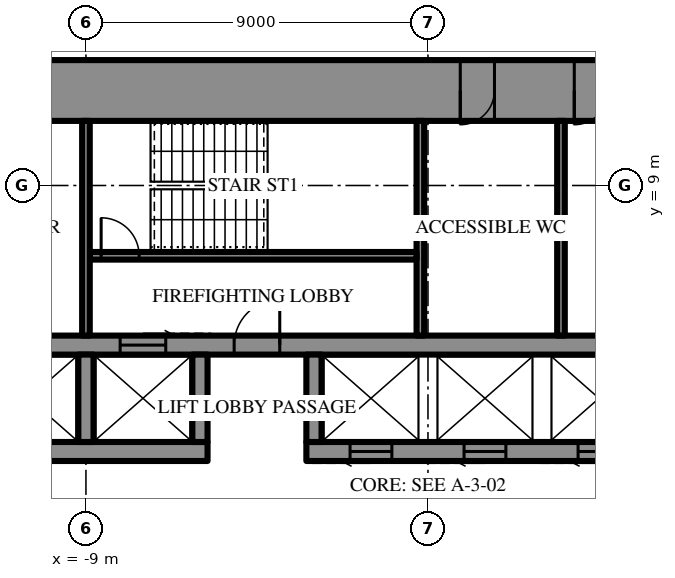
"""IFC4 building model, lengths in metres.
Left out: names, types, materials, properties, quantities, classifications, styles, units other than length and angle.
Written with IfcOpenShell. Run it as: python <this file> out.ifc"""

import sys

from ifc_helpers import new_model, si_unit, direction, frame, frame_2d, origin, place, context, subcontext, project, spatial, rectangle, extrude, element, fill, save


model = new_model("IFC4")
c1 = context("Model", 3, precision=1e-05, world=origin(), true_north=direction((0.0, 1.0)))
c2 = subcontext(c1, "Body", "Model", "MODEL_VIEW")
j1 = project(units=[si_unit("LENGTHUNIT", "METRE"), si_unit("PLANEANGLEUNIT", "RADIAN")], contexts=[c1])
p1 = place(None, origin())
s1 = spatial("IfcSite", under=j1, at=p1, CompositionType="ELEMENT")
p2 = place(p1, origin())
s2 = spatial("IfcBuilding", under=s1, at=p2, CompositionType="ELEMENT")
p3 = place(p2, frame((0.0, 0.0, 195.1)))
s3 = spatial("IfcBuildingStorey", under=s2, at=p3, CompositionType="ELEMENT", Elevation=195.1)
p4 = place(p3, frame((-18.6, 11.5, 0.0), z_axis=(0.0, 0.0, 1.0), x_axis=(1.0, 0.0, 0.0)))
e1 = element("IfcWall", 1, at=p4, inside=s3, PredefinedType="SHEAR", context=c2, shape_type="SweptSolid", body=[
    extrude(rectangle(XDim=37.2, YDim=1.6, at=frame_2d((18.6, 0.0))), origin(), (0.0, 0.0, 1.0), 4.2),
])
p5 = place(p4, frame((19.45, 0.0, 0.0)))
e2 = element("IfcOpeningElement", 2, at=p5, cuts=e1, PredefinedType="OPENING", context=c2, shape_type="SweptSolid", body=[
    extrude(rectangle(XDim=0.9, YDim=2.2, at=frame_2d((0.45, 1.1))), frame((0.0, 0.81, 0.0), z_axis=(0.0, -1.0, 0.0), x_axis=(1.0, 0.0, 0.0)), (0.0, 0.0, 1.0), 1.62),
])
p6 = place(p4, frame((22.45, 0.0, 0.0)))
e3 = element("IfcOpeningElement", 3, at=p6, cuts=e1, PredefinedType="OPENING", context=c2, shape_type="SweptSolid", body=[
    extrude(rectangle(XDim=0.9, YDim=2.2, at=frame_2d((0.45, 1.1))), frame((0.0, 0.81, 0.0), z_axis=(0.0, -1.0, 0.0), x_axis=(1.0, 0.0, 0.0)), (0.0, 0.0, 1.0), 1.62),
])
p7 = place(p4, frame((25.5, 0.0, 0.0)))
e4 = element("IfcOpeningElement", 4, at=p7, cuts=e1, PredefinedType="OPENING", context=c2, shape_type="SweptSolid", body=[
    extrude(rectangle(XDim=1.0, YDim=2.2, at=frame_2d((0.5, 1.1))), frame((0.0, 0.81, 0.0), z_axis=(0.0, -1.0, 0.0), x_axis=(1.0, 0.0, 0.0)), (0.0, 0.0, 1.0), 1.62),
])
p8 = place(p4, frame((1.8, 0.0, 0.0)))
e5 = element("IfcOpeningElement", 5, at=p8, cuts=e1, PredefinedType="OPENING", context=c2, shape_type="SweptSolid", body=[
    extrude(rectangle(XDim=0.9, YDim=2.2, at=frame_2d((0.45, 1.1))), frame((0.0, 0.81, 0.0), z_axis=(0.0, -1.0, 0.0), x_axis=(1.0, 0.0, 0.0)), (0.0, 0.0, 1.0), 1.62),
])
p9 = place(p4, frame((4.65, 0.0, 0.0)))
e6 = element("IfcOpeningElement", 6, at=p9, cuts=e1, PredefinedType="OPENING", context=c2, shape_type="SweptSolid", body=[
    extrude(rectangle(XDim=0.9, YDim=2.2, at=frame_2d((0.45, 1.1))), frame((0.0, 0.81, 0.0), z_axis=(0.0, -1.0, 0.0), x_axis=(1.0, 0.0, 0.0)), (0.0, 0.0, 1.0), 1.62),
])
p10 = place(p4, frame((7.75, 0.0, 0.0)))
e7 = element("IfcOpeningElement", 7, at=p10, cuts=e1, PredefinedType="OPENING", context=c2, shape_type="SweptSolid", body=[
    extrude(rectangle(XDim=0.9, YDim=2.2, at=frame_2d((0.45, 1.1))), frame((0.0, 0.81, 0.0), z_axis=(0.0, -1.0, 0.0), x_axis=(1.0, 0.0, 0.0)), (0.0, 0.0, 1.0), 1.62),
])
p11 = place(p4, frame((28.55, 0.0, 0.0)))
e8 = element("IfcOpeningElement", 8, at=p11, cuts=e1, PredefinedType="OPENING", context=c2, shape_type="SweptSolid", body=[
    extrude(rectangle(XDim=0.9, YDim=2.2, at=frame_2d((0.45, 1.1))), frame((0.0, 0.81, 0.0), z_axis=(0.0, -1.0, 0.0), x_axis=(1.0, 0.0, 0.0)), (0.0, 0.0, 1.0), 1.62),
])
p12 = place(p4, frame((31.65, 0.0, 0.0)))
e9 = element("IfcOpeningElement", 9, at=p12, cuts=e1, PredefinedType="OPENING", context=c2, shape_type="SweptSolid", body=[
    extrude(rectangle(XDim=0.9, YDim=2.2, at=frame_2d((0.45, 1.1))), frame((0.0, 0.81, 0.0), z_axis=(0.0, -1.0, 0.0), x_axis=(1.0, 0.0, 0.0)), (0.0, 0.0, 1.0), 1.62),
])
p13 = place(p4, frame((34.5, 0.0, 0.0)))
e10 = element("IfcOpeningElement", 10, at=p13, cuts=e1, PredefinedType="OPENING", context=c2, shape_type="SweptSolid", body=[
    extrude(rectangle(XDim=0.9, YDim=2.2, at=frame_2d((0.45, 1.1))), frame((0.0, 0.81, 0.0), z_axis=(0.0, -1.0, 0.0), x_axis=(1.0, 0.0, 0.0)), (0.0, 0.0, 1.0), 1.62),
])
p14 = place(p3, frame((-11.7, 2.0, 0.0), z_axis=(0.0, 0.0, 1.0), x_axis=(1.0, 0.0, 0.0)))
e11 = element("IfcWall", 11, at=p14, inside=s3, PredefinedType="SHEAR", context=c2, shape_type="SweptSolid", body=[
    extrude(rectangle(XDim=5.9, YDim=0.5, at=frame_2d((2.95, 0.0))), origin(), (0.0, 0.0, 1.0), 4.2),
])
p15 = place(p3, frame((-3.2, 2.0, 0.0), z_axis=(0.0, 0.0, 1.0), x_axis=(1.0, 0.0, 0.0)))
e12 = element("IfcWall", 12, at=p15, inside=s3, PredefinedType="SHEAR", context=c2, shape_type="SweptSolid", body=[
    extrude(rectangle(XDim=14.9, YDim=0.5, at=frame_2d((7.45, 0.0))), origin(), (0.0, 0.0, 1.0), 4.2),
])
p16 = place(p15, frame((1.15, 0.0, 0.0)))
e13 = element("IfcOpeningElement", 13, at=p16, cuts=e12, PredefinedType="OPENING", context=c2, shape_type="SweptSolid", body=[
    extrude(rectangle(XDim=1.1, YDim=2.2, at=frame_2d((0.55, 1.1))), frame((0.0, 0.26, 0.0), z_axis=(0.0, -1.0, 0.0), x_axis=(1.0, 0.0, 0.0)), (0.0, 0.0, 1.0), 0.52),
])
p17 = place(p15, frame((4.15, 0.0, 0.0)))
e14 = element("IfcOpeningElement", 14, at=p17, cuts=e12, PredefinedType="OPENING", context=c2, shape_type="SweptSolid", body=[
    extrude(rectangle(XDim=1.1, YDim=2.2, at=frame_2d((0.55, 1.1))), frame((0.0, 0.26, 0.0), z_axis=(0.0, -1.0, 0.0), x_axis=(1.0, 0.0, 0.0)), (0.0, 0.0, 1.0), 0.52),
])
p18 = place(p15, frame((7.15, 0.0, 0.0)))
e15 = element("IfcOpeningElement", 15, at=p18, cuts=e12, PredefinedType="OPENING", context=c2, shape_type="SweptSolid", body=[
    extrude(rectangle(XDim=1.1, YDim=2.2, at=frame_2d((0.55, 1.1))), frame((0.0, 0.26, 0.0), z_axis=(0.0, -1.0, 0.0), x_axis=(1.0, 0.0, 0.0)), (0.0, 0.0, 1.0), 0.52),
])
p19 = place(p15, frame((10.15, 0.0, 0.0)))
e16 = element("IfcOpeningElement", 16, at=p19, cuts=e12, PredefinedType="OPENING", context=c2, shape_type="SweptSolid", body=[
    extrude(rectangle(XDim=1.1, YDim=2.2, at=frame_2d((0.55, 1.1))), frame((0.0, 0.26, 0.0), z_axis=(0.0, -1.0, 0.0), x_axis=(1.0, 0.0, 0.0)), (0.0, 0.0, 1.0), 0.52),
])
p20 = place(p3, frame((-11.7, 4.8, 0.0), z_axis=(0.0, 0.0, 1.0), x_axis=(1.0, 0.0, 0.0)))
e17 = element("IfcWall", 17, at=p20, inside=s3, PredefinedType="SHEAR", context=c2, shape_type="SweptSolid", body=[
    extrude(rectangle(XDim=23.4, YDim=0.5, at=frame_2d((11.7, 0.0))), origin(), (0.0, 0.0, 1.0), 4.2),
])
p21 = place(p20, frame((6.6, 0.0, 0.0)))
e18 = element("IfcOpeningElement", 18, at=p21, cuts=e17, PredefinedType="OPENING", context=c2, shape_type="SweptSolid", body=[
    extrude(rectangle(XDim=1.2, YDim=2.2, at=frame_2d((0.6, 1.1))), frame((0.0, 0.26, 0.0), z_axis=(0.0, -1.0, 0.0), x_axis=(1.0, 0.0, 0.0)), (0.0, 0.0, 1.0), 0.52),
])
p22 = place(p20, frame((3.6, 0.0, 0.0)))
e19 = element("IfcOpeningElement", 19, at=p22, cuts=e17, PredefinedType="OPENING", context=c2, shape_type="SweptSolid", body=[
    extrude(rectangle(XDim=1.2, YDim=2.2, at=frame_2d((0.6, 1.1))), frame((0.0, 0.26, 0.0), z_axis=(0.0, -1.0, 0.0), x_axis=(1.0, 0.0, 0.0)), (0.0, 0.0, 1.0), 0.52),
])
for number, where, z_axis, x_axis in (
    (20, (-9.0, 2.25, 0.0), (0.0, 0.0, 1.0), (0.0, 1.0, 0.0)),
    (21, (-6.0, 2.25, 0.0), (0.0, 0.0, 1.0), (0.0, 1.0, 0.0)),
    (22, (-3.0, 2.25, 0.0), (0.0, 0.0, 1.0), (0.0, 1.0, 0.0)),
):
    element("IfcWall", number, at=place(p3, frame(where, z_axis=z_axis, x_axis=x_axis)), inside=s3, PredefinedType="SHEAR", context=c2, shape_type="SweptSolid", body=[
        extrude(rectangle(XDim=2.3, YDim=0.4, at=frame_2d((1.15, 0.0))), origin(), (0.0, 0.0, 1.0), 4.2),
    ])
p23 = place(p3, frame((-0.2, 5.05, 0.0), z_axis=(0.0, 0.0, 1.0), x_axis=(0.0, 1.0, 0.0)))
e23 = element("IfcWall", 23, at=p23, inside=s3, PredefinedType="SHEAR", context=c2, shape_type="SweptSolid", body=[
    extrude(rectangle(XDim=5.65, YDim=0.2, at=frame_2d((2.825, 0.0))), origin(), (0.0, 0.0, 1.0), 4.2),
])
p24 = place(p3, frame((-8.9, 7.15, 0.0), z_axis=(0.0, 0.0, 1.0), x_axis=(1.0, 0.0, 0.0)))
e24 = element("IfcWall", 24, at=p24, inside=s3, PredefinedType="SHEAR", context=c2, shape_type="SweptSolid", body=[
    extrude(rectangle(XDim=8.6, YDim=0.2, at=frame_2d((4.3, 0.0))), origin(), (0.0, 0.0, 1.0), 4.2),
])
p25 = place(p24, frame((0.3, 0.0, 0.0)))
e25 = element("IfcOpeningElement", 25, at=p25, cuts=e24, PredefinedType="OPENING", context=c2, shape_type="SweptSolid", body=[
    extrude(rectangle(XDim=1.0, YDim=2.2, at=frame_2d((0.5, 1.1))), frame((0.0, 0.11, 0.0), z_axis=(0.0, -1.0, 0.0), x_axis=(1.0, 0.0, 0.0)), (0.0, 0.0, 1.0), 0.22),
])
for number, where, z_axis, x_axis in (
    (26, (-9.0, 5.05, 0.0), (0.0, 0.0, 1.0), (0.0, 1.0, 0.0)),
    (27, (3.5, 5.05, 0.0), (0.0, 0.0, 1.0), (0.0, 1.0, 0.0)),
):
    element("IfcWall", number, at=place(p3, frame(where, z_axis=z_axis, x_axis=x_axis)), inside=s3, PredefinedType="PARTITIONING", context=c2, shape_type="SweptSolid", body=[
        extrude(rectangle(XDim=5.65, YDim=0.2, at=frame_2d((2.825, 0.0))), origin(), (0.0, 0.0, 1.0), 4.0),
    ])
p26 = place(p21, origin())
e28 = element("IfcDoor", 28, at=p26, inside=s3, OperationType="SINGLE_SWING_LEFT", PredefinedType="DOOR", context=c2, shape_type="SweptSolid", body=[
    extrude(rectangle(XDim=1.2, YDim=2.2, at=frame_2d((0.6, 1.1))), frame((0.0, 0.025, 0.0), z_axis=(0.0, -1.0, 0.0), x_axis=(1.0, 0.0, 0.0)), (0.0, 0.0, 1.0), 0.05),
])
fill(e18, e28)
p27 = place(p25, origin())
e29 = element("IfcDoor", 29, at=p27, inside=s3, OperationType="SINGLE_SWING_RIGHT", PredefinedType="DOOR", context=c2, shape_type="SweptSolid", body=[
    extrude(rectangle(XDim=1.0, YDim=2.2, at=frame_2d((0.5, 1.1))), frame((0.0, 0.025, 0.0), z_axis=(0.0, -1.0, 0.0), x_axis=(1.0, 0.0, 0.0)), (0.0, 0.0, 1.0), 0.05),
])
fill(e25, e29)
p28 = place(p5, frame((0.9, 0.0, 0.0), z_axis=(0.0, 0.0, 1.0), x_axis=(-1.0, 0.0, 0.0)))
e30 = element("IfcDoor", 30, at=p28, inside=s3, OperationType="SINGLE_SWING_LEFT", PredefinedType="DOOR", context=c2, shape_type="SweptSolid", body=[
    extrude(rectangle(XDim=0.9, YDim=2.2, at=frame_2d((0.45, 1.1))), frame((0.0, 0.025, 0.0), z_axis=(0.0, -1.0, 0.0), x_axis=(1.0, 0.0, 0.0)), (0.0, 0.0, 1.0), 0.05),
])
fill(e2, e30)
p29 = place(p6, frame((0.9, 0.0, 0.0), z_axis=(0.0, 0.0, 1.0), x_axis=(-1.0, 0.0, 0.0)))
e31 = element("IfcDoor", 31, at=p29, inside=s3, OperationType="SINGLE_SWING_LEFT", PredefinedType="DOOR", context=c2, shape_type="SweptSolid", body=[
    extrude(rectangle(XDim=0.9, YDim=2.2, at=frame_2d((0.45, 1.1))), frame((0.0, 0.025, 0.0), z_axis=(0.0, -1.0, 0.0), x_axis=(1.0, 0.0, 0.0)), (0.0, 0.0, 1.0), 0.05),
])
fill(e3, e31)
p30 = place(p22, origin())
e32 = element("IfcDoor", 32, at=p30, inside=s3, OperationType="SLIDING_TO_LEFT", PredefinedType="DOOR", context=c2, shape_type="SweptSolid", body=[
    extrude(rectangle(XDim=1.2, YDim=2.2, at=frame_2d((0.6, 1.1))), frame((0.0, 0.025, 0.0), z_axis=(0.0, -1.0, 0.0), x_axis=(1.0, 0.0, 0.0)), (0.0, 0.0, 1.0), 0.05),
])
fill(e19, e32)
p31 = place(p16, frame((1.1, 0.0, 0.0), z_axis=(0.0, 0.0, 1.0), x_axis=(-1.0, 0.0, 0.0)))
e33 = element("IfcDoor", 33, at=p31, inside=s3, OperationType="SLIDING_TO_LEFT", PredefinedType="DOOR", context=c2, shape_type="SweptSolid", body=[
    extrude(rectangle(XDim=1.1, YDim=2.2, at=frame_2d((0.55, 1.1))), frame((0.0, 0.025, 0.0), z_axis=(0.0, -1.0, 0.0), x_axis=(1.0, 0.0, 0.0)), (0.0, 0.0, 1.0), 0.05),
])
fill(e13, e33)
p32 = place(p17, frame((1.1, 0.0, 0.0), z_axis=(0.0, 0.0, 1.0), x_axis=(-1.0, 0.0, 0.0)))
e34 = element("IfcDoor", 34, at=p32, inside=s3, OperationType="SLIDING_TO_LEFT", PredefinedType="DOOR", context=c2, shape_type="SweptSolid", body=[
    extrude(rectangle(XDim=1.1, YDim=2.2, at=frame_2d((0.55, 1.1))), frame((0.0, 0.025, 0.0), z_axis=(0.0, -1.0, 0.0), x_axis=(1.0, 0.0, 0.0)), (0.0, 0.0, 1.0), 0.05),
])
fill(e14, e34)
p33 = place(p18, frame((1.1, 0.0, 0.0), z_axis=(0.0, 0.0, 1.0), x_axis=(-1.0, 0.0, 0.0)))
e35 = element("IfcDoor", 35, at=p33, inside=s3, OperationType="SLIDING_TO_LEFT", PredefinedType="DOOR", context=c2, shape_type="SweptSolid", body=[
    extrude(rectangle(XDim=1.1, YDim=2.2, at=frame_2d((0.55, 1.1))), frame((0.0, 0.025, 0.0), z_axis=(0.0, -1.0, 0.0), x_axis=(1.0, 0.0, 0.0)), (0.0, 0.0, 1.0), 0.05),
])
fill(e15, e35)
save(model, sys.argv[1])
